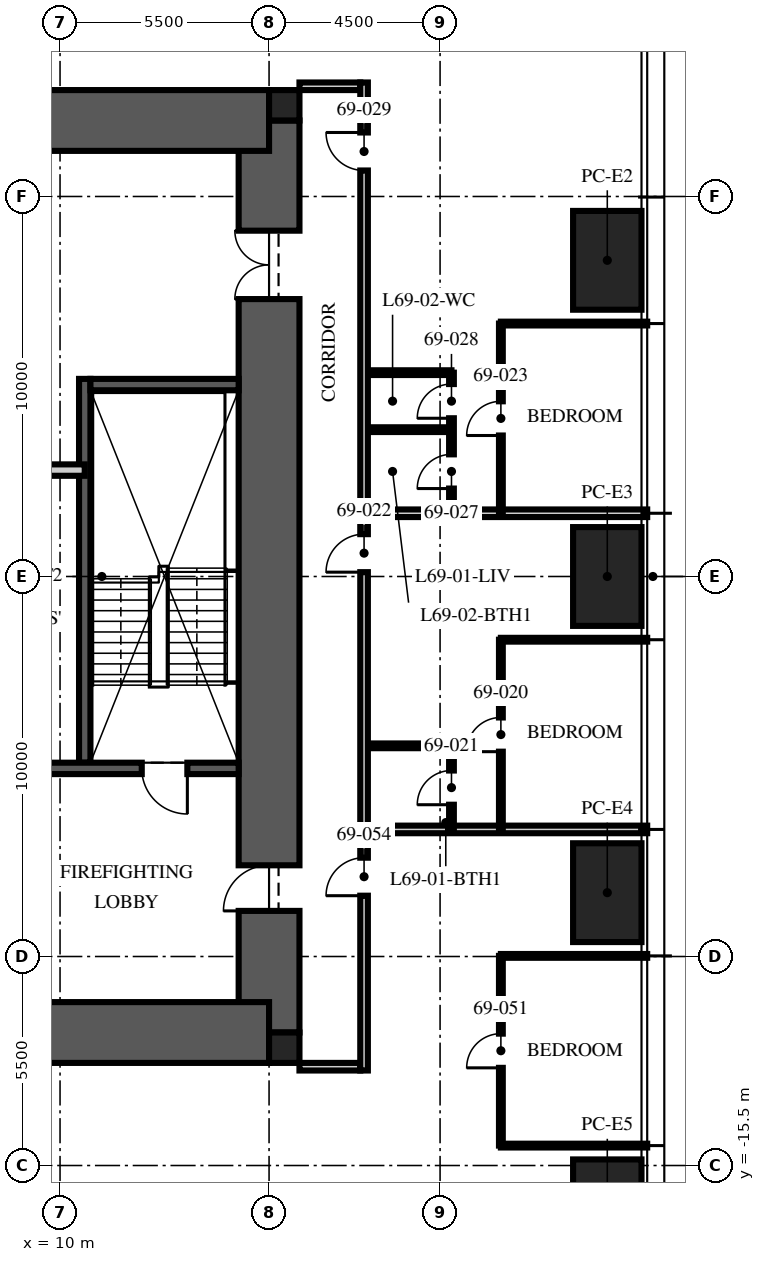
"""IFC4 building model, lengths in metres.
Left out: names, types, materials, properties, quantities, classifications, styles, units other than length and angle.
Written with IfcOpenShell. Run it as: python <this file> out.ifc"""

import sys

from ifc_helpers import new_model, si_unit, direction, frame, frame_2d, origin, origin_2d, place, context, subcontext, project, spatial, rectangle, hollow_rectangle, extrude, element, fill, save


model = new_model("IFC4")
c1 = context("Model", 3, precision=1e-05, world=origin(), true_north=direction((0.0, 1.0)))
c2 = subcontext(c1, "Body", "Model", "MODEL_VIEW")
j1 = project(units=[si_unit("LENGTHUNIT", "METRE"), si_unit("PLANEANGLEUNIT", "RADIAN")], contexts=[c1])
p1 = place(None, origin())
s1 = spatial("IfcSite", under=j1, at=p1, CompositionType="ELEMENT")
p2 = place(p1, origin())
s2 = spatial("IfcBuilding", under=s1, at=p2, CompositionType="ELEMENT")
p3 = place(p2, frame((0.0, 0.0, 274.5)))
s3 = spatial("IfcBuildingStorey", under=s2, at=p3, CompositionType="ELEMENT", Elevation=274.5)
p4 = place(p3, frame((15.5, -12.0, -0.25), z_axis=(0.0, 0.0, 1.0), x_axis=(0.0, 1.0, 0.0)))
e1 = element("IfcWall", 1, at=p4, inside=s3, PredefinedType="SHEAR", context=c2, shape_type="SweptSolid", body=[
    extrude(rectangle(XDim=24.0, YDim=1.6, at=frame_2d((12.0, 0.0))), origin(), (0.0, 0.0, 1.0), 3.65),
])
p5 = place(p4, frame((3.2, 0.0, 0.25)))
e2 = element("IfcOpeningElement", 2, at=p5, cuts=e1, PredefinedType="OPENING", context=c2, shape_type="SweptSolid", body=[
    extrude(rectangle(XDim=1.2, YDim=2.1, at=frame_2d((0.6, 1.05))), frame((0.0, 0.81, 0.0), z_axis=(0.0, -1.0, 0.0), x_axis=(1.0, 0.0, 0.0)), (0.0, 0.0, 1.0), 1.62),
])
p6 = place(p4, frame((19.3, 0.0, 0.25)))
e3 = element("IfcOpeningElement", 3, at=p6, cuts=e1, PredefinedType="OPENING", context=c2, shape_type="SweptSolid", body=[
    extrude(rectangle(XDim=1.8, YDim=2.1, at=frame_2d((0.9, 1.05))), frame((0.0, 0.81, 0.0), z_axis=(0.0, -1.0, 0.0), x_axis=(1.0, 0.0, 0.0)), (0.0, 0.0, 1.0), 1.62),
])
for number, where, z_axis, x_axis in (
    (4, (-15.5, 12.0, -0.25), (0.0, 0.0, 1.0), (1.0, 0.0, 0.0)),
    (5, (-15.5, -12.0, -0.25), (0.0, 0.0, 1.0), (1.0, 0.0, 0.0)),
):
    element("IfcWall", number, at=place(p3, frame(where, z_axis=z_axis, x_axis=x_axis)), inside=s3, PredefinedType="SHEAR", context=c2, shape_type="SweptSolid", body=[
        extrude(rectangle(XDim=31.0, YDim=1.6, at=frame_2d((15.5, 0.0))), origin(), (0.0, 0.0, 1.0), 3.65),
    ])
for number, where, z_axis, x_axis in (
    (6, (15.9, 12.4, -0.25), (0.0, 0.0, 1.0), (1.0, 0.0, 0.0)),
    (7, (15.9, -12.4, -0.25), (0.0, 0.0, 1.0), (1.0, 0.0, 0.0)),
):
    element("IfcColumn", number, at=place(p3, frame(where, z_axis=z_axis, x_axis=x_axis)), inside=s3, PredefinedType="COLUMN", context=c2, shape_type="SweptSolid", body=[
        extrude(rectangle(XDim=0.8, YDim=0.8, at=origin_2d()), origin(), (0.0, 0.0, 1.0), 3.65),
    ])
p7 = place(p3, frame((24.4, 8.32, 0.0), z_axis=(0.0, 0.0, 1.0), x_axis=(0.0, 1.0, 0.0)))
e8 = element("IfcColumn", 8, at=p7, inside=s3, PredefinedType="COLUMN", context=c2, shape_type="SweptSolid", body=[
    extrude(hollow_rectangle(XDim=2.6, YDim=1.8, WallThickness=0.14, at=origin_2d()), origin(), (0.0, 0.0, 1.0), 2.64),
])
p8 = place(p3, frame((24.4, 0.0, 0.0), z_axis=(0.0, 0.0, 1.0), x_axis=(0.0, 1.0, 0.0)))
e9 = element("IfcColumn", 9, at=p8, inside=s3, PredefinedType="COLUMN", context=c2, shape_type="SweptSolid", body=[
    extrude(hollow_rectangle(XDim=2.6, YDim=1.8, WallThickness=0.14, at=origin_2d()), origin(), (0.0, 0.0, 1.0), 2.78),
])
p9 = place(p3, frame((24.4, -8.32, 0.0), z_axis=(0.0, 0.0, 1.0), x_axis=(0.0, 1.0, 0.0)))
e10 = element("IfcColumn", 10, at=p9, inside=s3, PredefinedType="COLUMN", context=c2, shape_type="SweptSolid", body=[
    extrude(hollow_rectangle(XDim=2.6, YDim=1.8, WallThickness=0.14, at=origin_2d()), origin(), (0.0, 0.0, 1.0), 2.64),
])
p10 = place(p3, frame((24.4, -16.64, 0.0), z_axis=(0.0, 0.0, 1.0), x_axis=(0.0, 1.0, 0.0)))
e11 = element("IfcColumn", 11, at=p10, inside=s3, PredefinedType="COLUMN", context=c2, shape_type="SweptSolid", body=[
    extrude(hollow_rectangle(XDim=2.6, YDim=1.8, WallThickness=0.14, at=origin_2d()), origin(), (0.0, 0.0, 1.0), 2.51),
])
p11 = place(p3, frame((10.65, -4.9, 0.0), z_axis=(0.0, 0.0, 1.0), x_axis=(0.0, 1.0, 0.0)))
e12 = element("IfcWall", 12, at=p11, inside=s3, PredefinedType="SOLIDWALL", context=c2, shape_type="SweptSolid", body=[
    extrude(rectangle(XDim=10.1, YDim=0.3, at=frame_2d((5.05, 0.0))), origin(), (0.0, 0.0, 1.0), 3.4),
])
p12 = place(p3, frame((14.7, -5.05, 0.0), z_axis=(0.0, 0.0, 1.0), x_axis=(-1.0, 0.0, 0.0)))
e13 = element("IfcWall", 13, at=p12, inside=s3, PredefinedType="SOLIDWALL", context=c2, shape_type="SweptSolid", body=[
    extrude(rectangle(XDim=5.9, YDim=0.3, at=frame_2d((2.95, 0.0))), origin(), (0.0, 0.0, 1.0), 3.4),
])
p13 = place(p12, frame((1.35, 0.0, 0.0)))
e14 = element("IfcOpeningElement", 14, at=p13, cuts=e13, PredefinedType="OPENING", context=c2, shape_type="SweptSolid", body=[
    extrude(rectangle(XDim=1.2, YDim=2.1, at=frame_2d((0.6, 1.05))), frame((0.0, 0.16, 0.0), z_axis=(0.0, -1.0, 0.0), x_axis=(1.0, 0.0, 0.0)), (0.0, 0.0, 1.0), 0.32),
])
p14 = place(p3, frame((14.7, 5.05, 0.0), z_axis=(0.0, 0.0, 1.0), x_axis=(-1.0, 0.0, 0.0)))
e15 = element("IfcWall", 15, at=p14, inside=s3, PredefinedType="SOLIDWALL", context=c2, shape_type="SweptSolid", body=[
    extrude(rectangle(XDim=3.9, YDim=0.3, at=frame_2d((1.95, 0.0))), origin(), (0.0, 0.0, 1.0), 3.4),
])
p15 = place(p3, frame((-10.65, 2.8, 0.0), z_axis=(0.0, 0.0, 1.0), x_axis=(1.0, 0.0, 0.0)))
e16 = element("IfcWall", 16, at=p15, inside=s3, PredefinedType="PARTITIONING", context=c2, shape_type="SweptSolid", body=[
    extrude(rectangle(XDim=21.3, YDim=0.3, at=frame_2d((10.65, 0.0))), origin(), (0.0, 0.0, 1.0), 3.4),
])
p16 = place(p15, frame((10.05, 0.0, 0.0)))
e17 = element("IfcOpeningElement", 17, at=p16, cuts=e16, PredefinedType="OPENING", context=c2, shape_type="SweptSolid", body=[
    extrude(rectangle(XDim=1.2, YDim=2.1, at=frame_2d((0.6, 1.05))), frame((0.0, 0.16, 0.0), z_axis=(0.0, -1.0, 0.0), x_axis=(1.0, 0.0, 0.0)), (0.0, 0.0, 1.0), 0.32),
])
p17 = place(p15, frame((1.493, 0.0, 0.0)))
e18 = element("IfcOpeningElement", 18, at=p17, cuts=e16, PredefinedType="OPENING", context=c2, shape_type="SweptSolid", body=[
    extrude(rectangle(XDim=0.9, YDim=2.1, at=frame_2d((0.45, 1.05))), frame((0.0, 0.16, 0.0), z_axis=(0.0, -1.0, 0.0), x_axis=(1.0, 0.0, 0.0)), (0.0, 0.0, 1.0), 0.32),
])
p18 = place(p15, frame((18.836, 0.0, 0.0)))
e19 = element("IfcOpeningElement", 19, at=p18, cuts=e16, PredefinedType="OPENING", context=c2, shape_type="SweptSolid", body=[
    extrude(rectangle(XDim=0.9, YDim=2.1, at=frame_2d((0.45, 1.05))), frame((0.0, 0.16, 0.0), z_axis=(0.0, -1.0, 0.0), x_axis=(1.0, 0.0, 0.0)), (0.0, 0.0, 1.0), 0.32),
])
for number, where, z_axis, x_axis in (
    (20, (16.3, 12.9, 0.0), (0.0, 0.0, 1.0), (1.0, 0.0, 0.0)),
    (21, (16.3, -12.9, 0.0), (0.0, 0.0, 1.0), (1.0, 0.0, 0.0)),
):
    element("IfcWall", number, at=place(p3, frame(where, z_axis=z_axis, x_axis=x_axis)), inside=s3, PredefinedType="PARTITIONING", context=c2, shape_type="SweptSolid", body=[
        extrude(rectangle(XDim=1.6, YDim=0.2, at=frame_2d((0.8, 0.0))), origin(), (0.0, 0.0, 1.0), 2.2),
    ])
p19 = place(p3, frame((18.1, -6.656, 0.0), z_axis=(0.0, 0.0, 1.0), x_axis=(1.0, 0.0, 0.0)))
e22 = element("IfcWall", 22, at=p19, inside=s3, PredefinedType="PARTITIONING", context=c2, shape_type="SweptSolid", body=[
    extrude(rectangle(XDim=7.35, YDim=0.2, at=frame_2d((3.675, 0.0))), origin(), (0.0, 0.0, 1.0), 2.75),
])
p20 = place(p3, frame((21.6, -1.664, 0.0), z_axis=(0.0, 0.0, 1.0), x_axis=(1.0, 0.0, 0.0)))
e23 = element("IfcWall", 23, at=p20, inside=s3, PredefinedType="PARTITIONING", context=c2, shape_type="SweptSolid", body=[
    extrude(rectangle(XDim=3.85, YDim=0.1, at=frame_2d((1.925, 0.0))), origin(), (0.0, 0.0, 1.0), 2.75),
])
p21 = place(p3, frame((18.1, 1.664, 0.0), z_axis=(0.0, 0.0, 1.0), x_axis=(1.0, 0.0, 0.0)))
e24 = element("IfcWall", 24, at=p21, inside=s3, PredefinedType="PARTITIONING", context=c2, shape_type="SweptSolid", body=[
    extrude(rectangle(XDim=7.35, YDim=0.2, at=frame_2d((3.675, 0.0))), origin(), (0.0, 0.0, 1.0), 2.75),
])
for number, where, z_axis, x_axis in (
    (25, (21.6, 6.656, 0.0), (0.0, 0.0, 1.0), (1.0, 0.0, 0.0)),
    (26, (21.6, -14.976, 0.0), (0.0, 0.0, 1.0), (1.0, 0.0, 0.0)),
    (27, (21.6, -9.984, 0.0), (0.0, 0.0, 1.0), (1.0, 0.0, 0.0)),
):
    element("IfcWall", number, at=place(p3, frame(where, z_axis=z_axis, x_axis=x_axis)), inside=s3, PredefinedType="PARTITIONING", context=c2, shape_type="SweptSolid", body=[
        extrude(rectangle(XDim=3.85, YDim=0.1, at=frame_2d((1.925, 0.0))), origin(), (0.0, 0.0, 1.0), 2.75),
    ])
p22 = place(p3, frame((21.6, -6.656, 0.0), z_axis=(0.0, 0.0, 1.0), x_axis=(0.0, 1.0, 0.0)))
e28 = element("IfcWall", 28, at=p22, inside=s3, PredefinedType="PARTITIONING", context=c2, shape_type="SweptSolid", body=[
    extrude(rectangle(XDim=4.992, YDim=0.1, at=frame_2d((2.496, 0.0))), origin(), (0.0, 0.0, 1.0), 2.2),
])
p23 = place(p22, frame((2.046, 0.0, 0.0)))
e29 = element("IfcOpeningElement", 29, at=p23, cuts=e28, PredefinedType="OPENING", context=c2, shape_type="SweptSolid", body=[
    extrude(rectangle(XDim=0.9, YDim=2.1, at=frame_2d((0.45, 1.05))), frame((0.0, 0.06, 0.0), z_axis=(0.0, -1.0, 0.0), x_axis=(1.0, 0.0, 0.0)), (0.0, 0.0, 1.0), 0.12),
])
p24 = place(p3, frame((20.3, -6.656, 0.0), z_axis=(0.0, 0.0, 1.0), x_axis=(0.0, 1.0, 0.0)))
e30 = element("IfcWall", 30, at=p24, inside=s3, PredefinedType="PARTITIONING", context=c2, shape_type="SweptSolid", body=[
    extrude(rectangle(XDim=2.2, YDim=0.125, at=frame_2d((1.1, 0.0))), origin(), (0.0, 0.0, 1.0), 3.4),
])
p25 = place(p24, frame((0.65, 0.0, 0.0)))
e31 = element("IfcOpeningElement", 31, at=p25, cuts=e30, PredefinedType="OPENING", context=c2, shape_type="SweptSolid", body=[
    extrude(rectangle(XDim=0.9, YDim=2.1, at=frame_2d((0.45, 1.05))), frame((0.0, 0.073, 0.0), z_axis=(0.0, -1.0, 0.0), x_axis=(1.0, 0.0, 0.0)), (0.0, 0.0, 1.0), 0.145),
])
p26 = place(p3, frame((18.1, -4.456, 0.0), z_axis=(0.0, 0.0, 1.0), x_axis=(1.0, 0.0, 0.0)))
e32 = element("IfcWall", 32, at=p26, inside=s3, PredefinedType="PARTITIONING", context=c2, shape_type="SweptSolid", body=[
    extrude(rectangle(XDim=2.2, YDim=0.125, at=frame_2d((1.1, 0.0))), origin(), (0.0, 0.0, 1.0), 3.4),
])
p27 = place(p3, frame((21.6, 1.664, 0.0), z_axis=(0.0, 0.0, 1.0), x_axis=(0.0, 1.0, 0.0)))
e33 = element("IfcWall", 33, at=p27, inside=s3, PredefinedType="PARTITIONING", context=c2, shape_type="SweptSolid", body=[
    extrude(rectangle(XDim=4.992, YDim=0.1, at=frame_2d((2.496, 0.0))), origin(), (0.0, 0.0, 1.0), 2.2),
])
p28 = place(p27, frame((2.046, 0.0, 0.0)))
e34 = element("IfcOpeningElement", 34, at=p28, cuts=e33, PredefinedType="OPENING", context=c2, shape_type="SweptSolid", body=[
    extrude(rectangle(XDim=0.9, YDim=2.1, at=frame_2d((0.45, 1.05))), frame((0.0, 0.06, 0.0), z_axis=(0.0, -1.0, 0.0), x_axis=(1.0, 0.0, 0.0)), (0.0, 0.0, 1.0), 0.12),
])
p29 = place(p3, frame((20.3, 1.664, 0.0), z_axis=(0.0, 0.0, 1.0), x_axis=(0.0, 1.0, 0.0)))
e35 = element("IfcWall", 35, at=p29, inside=s3, PredefinedType="PARTITIONING", context=c2, shape_type="SweptSolid", body=[
    extrude(rectangle(XDim=3.7, YDim=0.125, at=frame_2d((1.85, 0.0))), origin(), (0.0, 0.0, 1.0), 2.2),
])
p30 = place(p29, frame((0.65, 0.0, 0.0)))
e36 = element("IfcOpeningElement", 36, at=p30, cuts=e35, PredefinedType="OPENING", context=c2, shape_type="SweptSolid", body=[
    extrude(rectangle(XDim=0.9, YDim=2.1, at=frame_2d((0.45, 1.05))), frame((0.0, 0.073, 0.0), z_axis=(0.0, -1.0, 0.0), x_axis=(1.0, 0.0, 0.0)), (0.0, 0.0, 1.0), 0.145),
])
p31 = place(p29, frame((2.5, 0.0, 0.0)))
e37 = element("IfcOpeningElement", 37, at=p31, cuts=e35, PredefinedType="OPENING", context=c2, shape_type="SweptSolid", body=[
    extrude(rectangle(XDim=0.9, YDim=2.1, at=frame_2d((0.45, 1.05))), frame((0.0, 0.073, 0.0), z_axis=(0.0, -1.0, 0.0), x_axis=(1.0, 0.0, 0.0)), (0.0, 0.0, 1.0), 0.145),
])
for number, where, z_axis, x_axis in (
    (38, (18.1, 3.864, 0.0), (0.0, 0.0, 1.0), (1.0, 0.0, 0.0)),
    (39, (18.1, 5.364, 0.0), (0.0, 0.0, 1.0), (1.0, 0.0, 0.0)),
):
    element("IfcWall", number, at=place(p3, frame(where, z_axis=z_axis, x_axis=x_axis)), inside=s3, PredefinedType="PARTITIONING", context=c2, shape_type="SweptSolid", body=[
        extrude(rectangle(XDim=2.2, YDim=0.125, at=frame_2d((1.1, 0.0))), origin(), (0.0, 0.0, 1.0), 3.4),
    ])
p32 = place(p3, frame((21.6, -14.976, 0.0), z_axis=(0.0, 0.0, 1.0), x_axis=(0.0, 1.0, 0.0)))
e40 = element("IfcWall", 40, at=p32, inside=s3, PredefinedType="PARTITIONING", context=c2, shape_type="SweptSolid", body=[
    extrude(rectangle(XDim=4.992, YDim=0.1, at=frame_2d((2.496, 0.0))), origin(), (0.0, 0.0, 1.0), 2.2),
])
p33 = place(p32, frame((2.046, 0.0, 0.0)))
e41 = element("IfcOpeningElement", 41, at=p33, cuts=e40, PredefinedType="OPENING", context=c2, shape_type="SweptSolid", body=[
    extrude(rectangle(XDim=0.9, YDim=2.1, at=frame_2d((0.45, 1.05))), frame((0.0, 0.06, 0.0), z_axis=(0.0, -1.0, 0.0), x_axis=(1.0, 0.0, 0.0)), (0.0, 0.0, 1.0), 0.12),
])
p34 = place(p3, frame((18.0, -13.0, 0.0), z_axis=(0.0, 0.0, 1.0), x_axis=(0.0, 1.0, 0.0)))
e42 = element("IfcWall", 42, at=p34, inside=s3, PredefinedType="PARTITIONING", context=c2, shape_type="SweptSolid", body=[
    extrude(rectangle(XDim=26.0, YDim=0.2, at=frame_2d((13.0, 0.0))), origin(), (0.0, 0.0, 1.0), 2.2),
])
p35 = place(p34, frame((13.114, 0.0, 0.0)))
e43 = element("IfcOpeningElement", 43, at=p35, cuts=e42, PredefinedType="OPENING", context=c2, shape_type="SweptSolid", body=[
    extrude(rectangle(XDim=1.0, YDim=2.2, at=frame_2d((0.5, 1.1))), frame((0.0, 0.11, 0.0), z_axis=(0.0, -1.0, 0.0), x_axis=(1.0, 0.0, 0.0)), (0.0, 0.0, 1.0), 0.22),
])
p36 = place(p34, frame((23.684, 0.0, 0.0)))
e44 = element("IfcOpeningElement", 44, at=p36, cuts=e42, PredefinedType="OPENING", context=c2, shape_type="SweptSolid", body=[
    extrude(rectangle(XDim=1.0, YDim=2.2, at=frame_2d((0.5, 1.1))), frame((0.0, 0.11, 0.0), z_axis=(0.0, -1.0, 0.0), x_axis=(1.0, 0.0, 0.0)), (0.0, 0.0, 1.0), 0.22),
])
p37 = place(p34, frame((4.6, 0.0, 0.0)))
e45 = element("IfcOpeningElement", 45, at=p37, cuts=e42, PredefinedType="OPENING", context=c2, shape_type="SweptSolid", body=[
    extrude(rectangle(XDim=1.0, YDim=2.2, at=frame_2d((0.5, 1.1))), frame((0.0, 0.11, 0.0), z_axis=(0.0, -1.0, 0.0), x_axis=(1.0, 0.0, 0.0)), (0.0, 0.0, 1.0), 0.22),
])
p38 = place(p13, origin())
e46 = element("IfcDoor", 46, at=p38, inside=s3, OperationType="SINGLE_SWING_LEFT", PredefinedType="DOOR", context=c2, shape_type="SweptSolid", body=[
    extrude(rectangle(XDim=1.2, YDim=2.1, at=frame_2d((0.6, 1.05))), frame((0.0, 0.025, 0.0), z_axis=(0.0, -1.0, 0.0), x_axis=(1.0, 0.0, 0.0)), (0.0, 0.0, 1.0), 0.05),
])
fill(e14, e46)
p39 = place(p5, origin())
e47 = element("IfcDoor", 47, at=p39, inside=s3, OperationType="SINGLE_SWING_LEFT", PredefinedType="DOOR", context=c2, shape_type="SweptSolid", body=[
    extrude(rectangle(XDim=1.2, YDim=2.1, at=frame_2d((0.6, 1.05))), frame((0.0, 0.025, 0.0), z_axis=(0.0, -1.0, 0.0), x_axis=(1.0, 0.0, 0.0)), (0.0, 0.0, 1.0), 0.05),
])
fill(e2, e47)
p40 = place(p6, origin())
e48 = element("IfcDoor", 48, at=p40, inside=s3, OperationType="DOUBLE_DOOR_SINGLE_SWING", PredefinedType="DOOR", context=c2, shape_type="SweptSolid", body=[
    extrude(rectangle(XDim=1.8, YDim=2.1, at=frame_2d((0.9, 1.05))), frame((0.0, 0.025, 0.0), z_axis=(0.0, -1.0, 0.0), x_axis=(1.0, 0.0, 0.0)), (0.0, 0.0, 1.0), 0.05),
])
fill(e3, e48)
p41 = place(p23, origin())
e49 = element("IfcDoor", 49, at=p41, inside=s3, OperationType="SINGLE_SWING_LEFT", PredefinedType="DOOR", context=c2, shape_type="SweptSolid", body=[
    extrude(rectangle(XDim=0.9, YDim=2.1, at=frame_2d((0.45, 1.05))), frame((0.0, 0.025, 0.0), z_axis=(0.0, -1.0, 0.0), x_axis=(1.0, 0.0, 0.0)), (0.0, 0.0, 1.0), 0.05),
])
fill(e29, e49)
p42 = place(p25, origin())
e50 = element("IfcDoor", 50, at=p42, inside=s3, OperationType="SINGLE_SWING_LEFT", PredefinedType="DOOR", context=c2, shape_type="SweptSolid", body=[
    extrude(rectangle(XDim=0.9, YDim=2.1, at=frame_2d((0.45, 1.05))), frame((0.0, 0.025, 0.0), z_axis=(0.0, -1.0, 0.0), x_axis=(1.0, 0.0, 0.0)), (0.0, 0.0, 1.0), 0.05),
])
fill(e31, e50)
p43 = place(p35, origin())
e51 = element("IfcDoor", 51, at=p43, inside=s3, OperationType="SINGLE_SWING_LEFT", PredefinedType="DOOR", context=c2, shape_type="SweptSolid", body=[
    extrude(rectangle(XDim=1.0, YDim=2.2, at=frame_2d((0.5, 1.1))), frame((0.0, 0.025, 0.0), z_axis=(0.0, -1.0, 0.0), x_axis=(1.0, 0.0, 0.0)), (0.0, 0.0, 1.0), 0.05),
])
fill(e43, e51)
p44 = place(p28, origin())
e52 = element("IfcDoor", 52, at=p44, inside=s3, OperationType="SINGLE_SWING_LEFT", PredefinedType="DOOR", context=c2, shape_type="SweptSolid", body=[
    extrude(rectangle(XDim=0.9, YDim=2.1, at=frame_2d((0.45, 1.05))), frame((0.0, 0.025, 0.0), z_axis=(0.0, -1.0, 0.0), x_axis=(1.0, 0.0, 0.0)), (0.0, 0.0, 1.0), 0.05),
])
fill(e34, e52)
p45 = place(p30, origin())
e53 = element("IfcDoor", 53, at=p45, inside=s3, OperationType="SINGLE_SWING_LEFT", PredefinedType="DOOR", context=c2, shape_type="SweptSolid", body=[
    extrude(rectangle(XDim=0.9, YDim=2.1, at=frame_2d((0.45, 1.05))), frame((0.0, 0.025, 0.0), z_axis=(0.0, -1.0, 0.0), x_axis=(1.0, 0.0, 0.0)), (0.0, 0.0, 1.0), 0.05),
])
fill(e36, e53)
p46 = place(p31, origin())
e54 = element("IfcDoor", 54, at=p46, inside=s3, OperationType="SINGLE_SWING_LEFT", PredefinedType="DOOR", context=c2, shape_type="SweptSolid", body=[
    extrude(rectangle(XDim=0.9, YDim=2.1, at=frame_2d((0.45, 1.05))), frame((0.0, 0.025, 0.0), z_axis=(0.0, -1.0, 0.0), x_axis=(1.0, 0.0, 0.0)), (0.0, 0.0, 1.0), 0.05),
])
fill(e37, e54)
p47 = place(p36, origin())
e55 = element("IfcDoor", 55, at=p47, inside=s3, OperationType="SINGLE_SWING_RIGHT", PredefinedType="DOOR", context=c2, shape_type="SweptSolid", body=[
    extrude(rectangle(XDim=1.0, YDim=2.2, at=frame_2d((0.5, 1.1))), frame((0.0, 0.025, 0.0), z_axis=(0.0, -1.0, 0.0), x_axis=(1.0, 0.0, 0.0)), (0.0, 0.0, 1.0), 0.05),
])
fill(e44, e55)
p48 = place(p33, origin())
e56 = element("IfcDoor", 56, at=p48, inside=s3, OperationType="SINGLE_SWING_LEFT", PredefinedType="DOOR", context=c2, shape_type="SweptSolid", body=[
    extrude(rectangle(XDim=0.9, YDim=2.1, at=frame_2d((0.45, 1.05))), frame((0.0, 0.025, 0.0), z_axis=(0.0, -1.0, 0.0), x_axis=(1.0, 0.0, 0.0)), (0.0, 0.0, 1.0), 0.05),
])
fill(e41, e56)
p49 = place(p37, origin())
e57 = element("IfcDoor", 57, at=p49, inside=s3, OperationType="SINGLE_SWING_LEFT", PredefinedType="DOOR", context=c2, shape_type="SweptSolid", body=[
    extrude(rectangle(XDim=1.0, YDim=2.2, at=frame_2d((0.5, 1.1))), frame((0.0, 0.025, 0.0), z_axis=(0.0, -1.0, 0.0), x_axis=(1.0, 0.0, 0.0)), (0.0, 0.0, 1.0), 0.05),
])
fill(e45, e57)
save(model, sys.argv[1])
